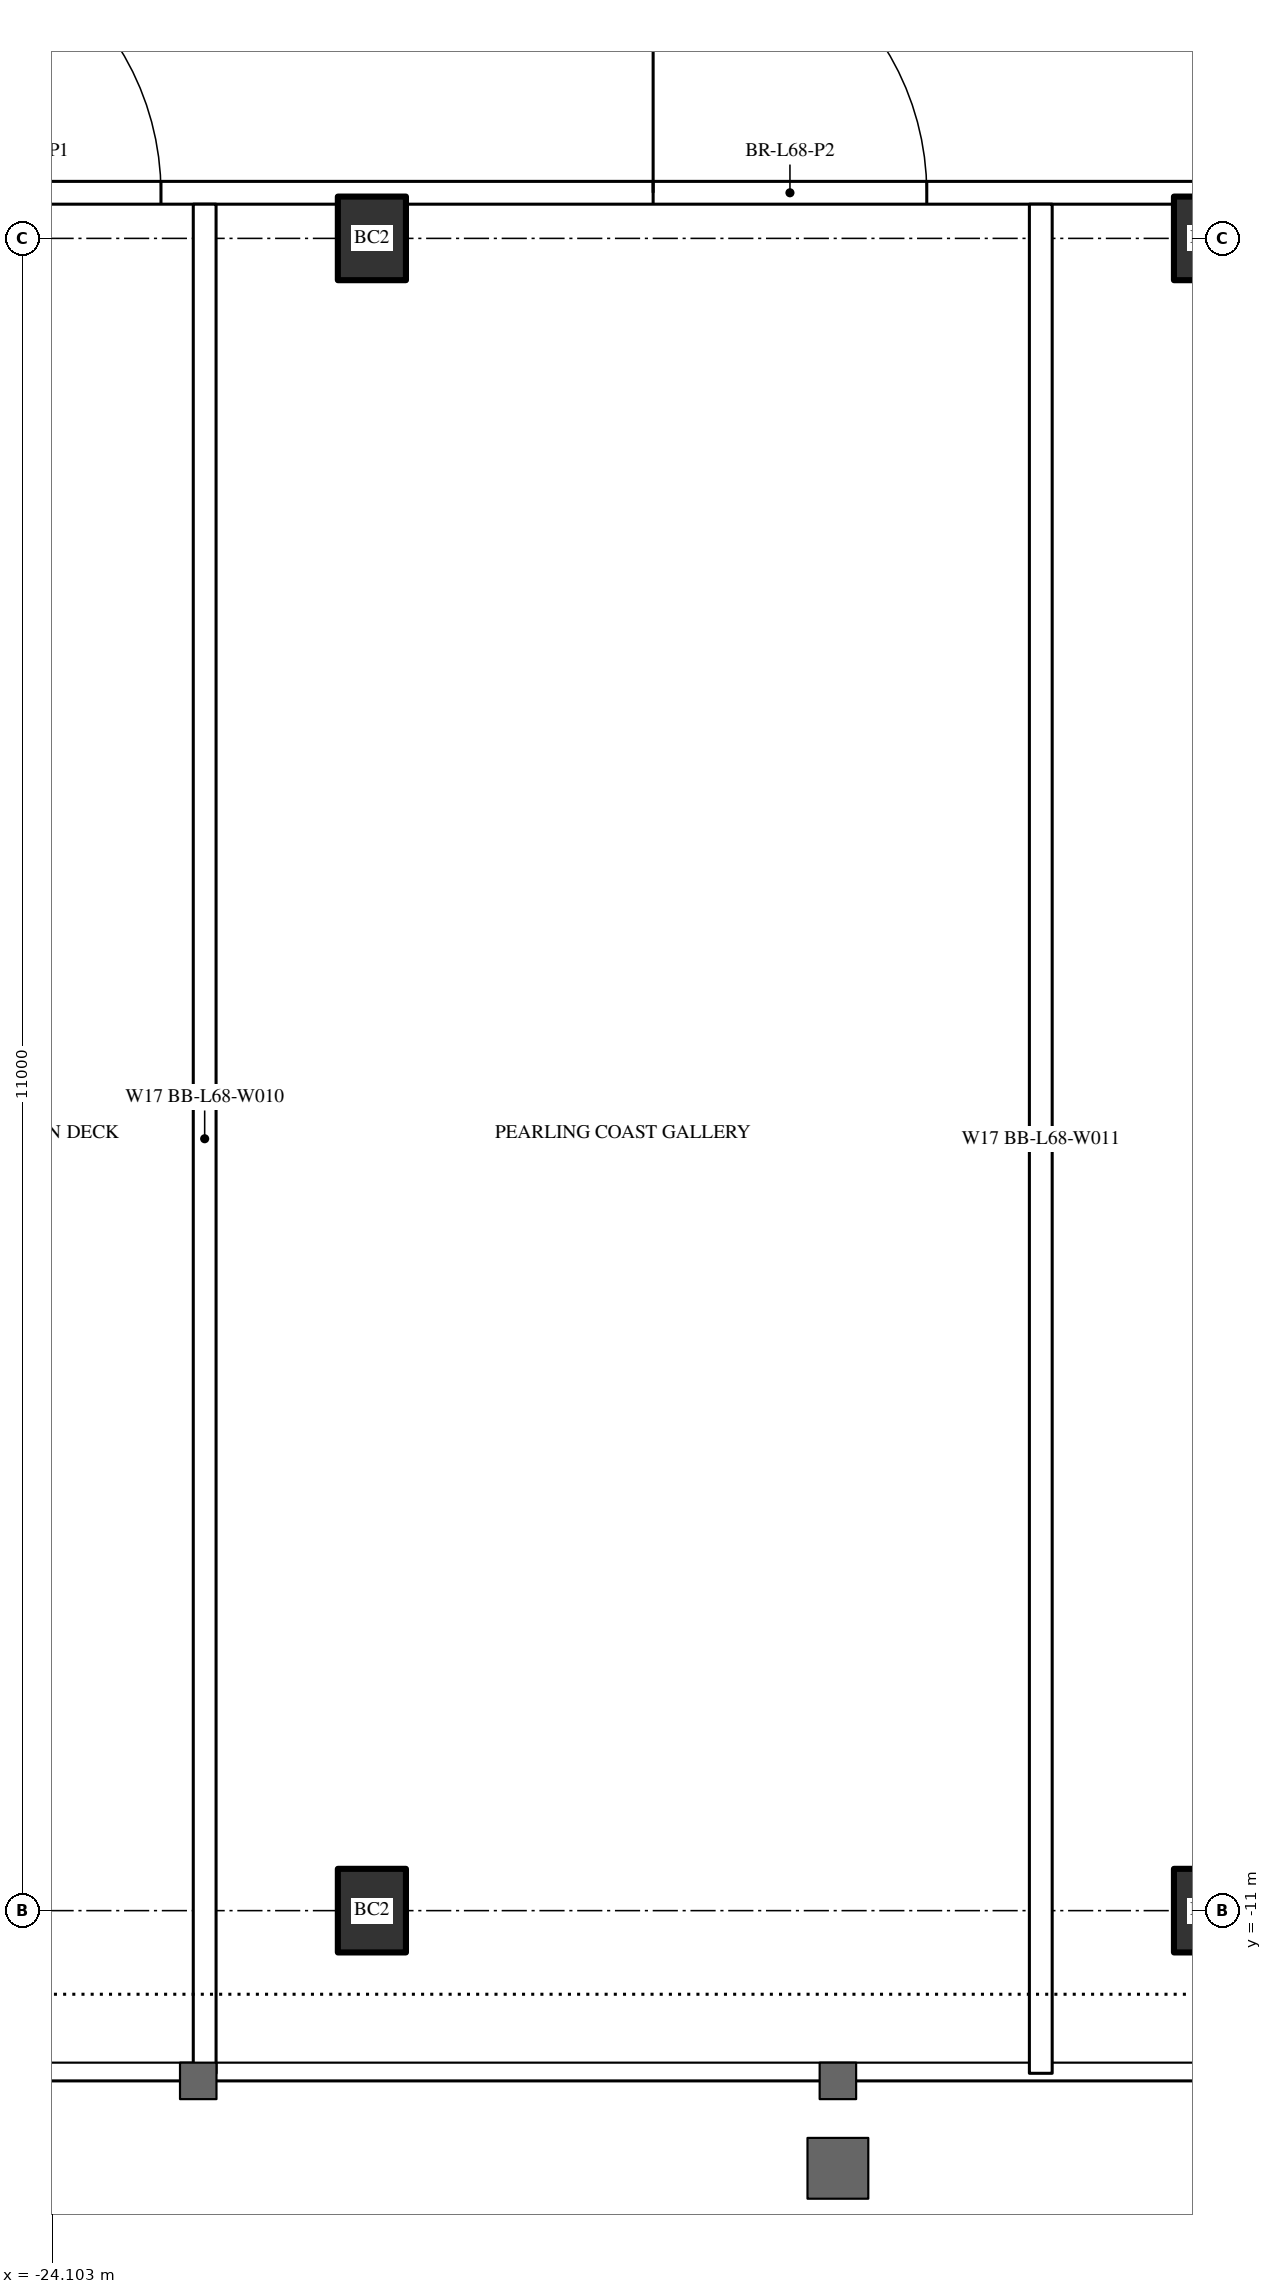
"""IFC4 building model, lengths in metres.
Left out: names, types, materials, properties, quantities, classifications, styles, units other than length and angle.
Written with IfcOpenShell. Run it as: python <this file> out.ifc"""

import sys

from ifc_helpers import new_model, si_unit, direction, frame, frame_2d, origin, origin_2d, place, context, subcontext, project, spatial, rectangle, i_section, extrude, element, fill, save


model = new_model("IFC4")
c1 = context("Model", 3, precision=1e-05, world=origin(), true_north=direction((0.0, 1.0)))
c2 = subcontext(c1, "Body", "Model", "MODEL_VIEW")
j1 = project(units=[si_unit("LENGTHUNIT", "METRE"), si_unit("PLANEANGLEUNIT", "RADIAN")], contexts=[c1])
p1 = place(None, origin())
s1 = spatial("IfcSite", under=j1, at=p1, CompositionType="ELEMENT")
p2 = place(p1, origin())
s2 = spatial("IfcBuilding", under=s1, at=p2, CompositionType="ELEMENT")
p3 = place(p2, frame((0.0, 0.0, 257.3)))
s3 = spatial("IfcBuildingStorey", under=s2, at=p3, CompositionType="ELEMENT", Elevation=257.3)
for number, where, z_axis, x_axis in (
    (1, (-22.0, -11.0, 0.0), (0.0, 0.0, 1.0), (1.0, 0.0, 0.0)),
    (2, (-16.5, -11.0, 0.0), (0.0, 0.0, 1.0), (1.0, 0.0, 0.0)),
    (3, (-22.0, 0.0, 0.0), (0.0, 0.0, 1.0), (1.0, 0.0, 0.0)),
    (4, (-16.5, 0.0, 0.0), (0.0, 0.0, 1.0), (1.0, 0.0, 0.0)),
):
    element("IfcColumn", number, at=place(p3, frame(where, z_axis=z_axis, x_axis=x_axis)), inside=s3, PredefinedType="COLUMN", context=c2, shape_type="SweptSolid", body=[
        extrude(i_section(OverallWidth=0.448, OverallDepth=0.55, WebThickness=0.072, FlangeThickness=0.115, FilletRadius=0.02, at=origin_2d()), origin(), (0.0, 0.0, 1.0), 6.0),
    ])
p4 = place(p3, frame((-25.55, 0.3, 0.0), z_axis=(0.0, 0.0, 1.0), x_axis=(1.0, 0.0, 0.0)))
e5 = element("IfcWall", 5, at=p4, inside=s3, PredefinedType="PARTITIONING", context=c2, shape_type="SweptSolid", body=[
    extrude(rectangle(XDim=51.1, YDim=0.15, at=frame_2d((25.55, 0.0))), origin(), (0.0, 0.0, 1.0), 4.8),
])
p5 = place(p4, frame((0.363, 0.0, 0.0)))
e6 = element("IfcOpeningElement", 6, at=p5, cuts=e5, PredefinedType="OPENING", context=c2, shape_type="SweptSolid", body=[
    extrude(rectangle(XDim=1.8, YDim=2.2, at=frame_2d((0.9, 1.1))), frame((0.0, 0.085, 0.0), z_axis=(0.0, -1.0, 0.0), x_axis=(1.0, 0.0, 0.0)), (0.0, 0.0, 1.0), 0.17),
])
p6 = place(p4, frame((5.4, 0.0, 0.0)))
e7 = element("IfcOpeningElement", 7, at=p6, cuts=e5, PredefinedType="OPENING", context=c2, shape_type="SweptSolid", body=[
    extrude(rectangle(XDim=1.8, YDim=2.2, at=frame_2d((0.9, 1.1))), frame((0.0, 0.085, 0.0), z_axis=(0.0, -1.0, 0.0), x_axis=(1.0, 0.0, 0.0)), (0.0, 0.0, 1.0), 0.17),
])
p7 = place(p4, frame((21.8, 0.0, 0.0)))
e8 = element("IfcOpeningElement", 8, at=p7, cuts=e5, PredefinedType="OPENING", context=c2, shape_type="SweptSolid", body=[
    extrude(rectangle(XDim=2.0, YDim=2.4, at=frame_2d((1.0, 1.2))), frame((0.0, 0.085, 0.0), z_axis=(0.0, -1.0, 0.0), x_axis=(1.0, 0.0, 0.0)), (0.0, 0.0, 1.0), 0.17),
])
p8 = place(p4, frame((43.9, 0.0, 0.0)))
e9 = element("IfcOpeningElement", 9, at=p8, cuts=e5, PredefinedType="OPENING", context=c2, shape_type="SweptSolid", body=[
    extrude(rectangle(XDim=1.8, YDim=2.2, at=frame_2d((0.9, 1.1))), frame((0.0, 0.085, 0.0), z_axis=(0.0, -1.0, 0.0), x_axis=(1.0, 0.0, 0.0)), (0.0, 0.0, 1.0), 0.17),
])
p9 = place(p4, frame((48.938, 0.0, 0.0)))
e10 = element("IfcOpeningElement", 10, at=p9, cuts=e5, PredefinedType="OPENING", context=c2, shape_type="SweptSolid", body=[
    extrude(rectangle(XDim=1.8, YDim=2.2, at=frame_2d((0.9, 1.1))), frame((0.0, 0.085, 0.0), z_axis=(0.0, -1.0, 0.0), x_axis=(1.0, 0.0, 0.0)), (0.0, 0.0, 1.0), 0.17),
])
for number, where, z_axis, x_axis in (
    (11, (-23.1, -12.07, 0.0), (0.0, 0.0, 1.0), (0.0, 1.0, 0.0)),
    (12, (-17.6, -12.07, 0.0), (0.0, 0.0, 1.0), (0.0, 1.0, 0.0)),
):
    element("IfcWall", number, at=place(p3, frame(where, z_axis=z_axis, x_axis=x_axis)), inside=s3, PredefinedType="PARTITIONING", context=c2, shape_type="SweptSolid", body=[
        extrude(rectangle(XDim=12.295, YDim=0.15, at=frame_2d((6.147, 0.0))), origin(), (0.0, 0.0, 1.0), 5.8),
    ])
p10 = place(p5, origin())
e13 = element("IfcDoor", 13, at=p10, inside=s3, OperationType="DOUBLE_DOOR_SINGLE_SWING", PredefinedType="DOOR", context=c2, shape_type="SweptSolid", body=[
    extrude(rectangle(XDim=1.8, YDim=2.2, at=frame_2d((0.9, 1.1))), frame((0.0, 0.025, 0.0), z_axis=(0.0, -1.0, 0.0), x_axis=(1.0, 0.0, 0.0)), (0.0, 0.0, 1.0), 0.05),
])
fill(e6, e13)
p11 = place(p6, origin())
e14 = element("IfcDoor", 14, at=p11, inside=s3, OperationType="DOUBLE_DOOR_SINGLE_SWING", PredefinedType="DOOR", context=c2, shape_type="SweptSolid", body=[
    extrude(rectangle(XDim=1.8, YDim=2.2, at=frame_2d((0.9, 1.1))), frame((0.0, 0.025, 0.0), z_axis=(0.0, -1.0, 0.0), x_axis=(1.0, 0.0, 0.0)), (0.0, 0.0, 1.0), 0.05),
])
fill(e7, e14)
save(model, sys.argv[1])
